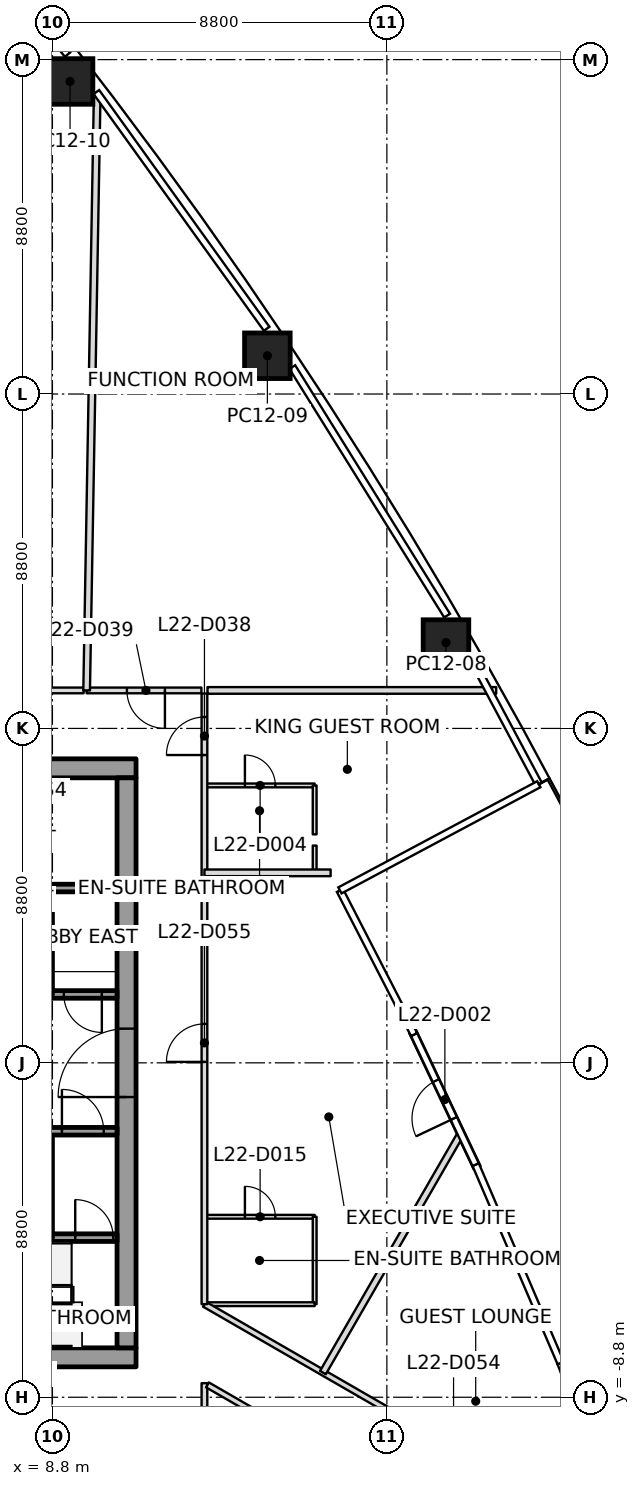
"""IFC4 building model, lengths in metres.
Left out: names, types, materials, properties, quantities, classifications, styles, units other than length and angle.
Written with IfcOpenShell. Run it as: python <this file> out.ifc"""

import sys

from ifc_helpers import new_model, si_unit, direction, frame, frame_2d, origin, origin_2d, place, context, subcontext, project, spatial, rectangle, extrude, clip, halfspace, element, fill, save


model = new_model("IFC4")
c1 = context("Model", 3, precision=1e-05, world=origin(), true_north=direction((0.0, 1.0)))
c2 = subcontext(c1, "Body", "Model", "MODEL_VIEW")
j1 = project(units=[si_unit("LENGTHUNIT", "METRE"), si_unit("PLANEANGLEUNIT", "RADIAN")], contexts=[c1])
p1 = place(None, origin())
s1 = spatial("IfcSite", under=j1, at=p1, CompositionType="ELEMENT")
p2 = place(p1, origin())
s2 = spatial("IfcBuilding", under=s1, at=p2, CompositionType="ELEMENT")
p3 = place(p2, frame((0.0, 0.0, 103.5)))
s3 = spatial("IfcBuildingStorey", under=s2, at=p3, CompositionType="ELEMENT", Elevation=103.5)
p4 = place(p3, frame((19.155, 11.059, 0.0), z_axis=(-0.010688725148, -0.006202099777, 0.999923639641), x_axis=(-0.499971436973, 0.8660418936, 2.7223042e-05)))
e1 = element("IfcColumn", 1, at=p4, inside=s3, PredefinedType="COLUMN", context=c2, shape_type="SweptSolid", body=[
    clip(extrude(rectangle(XDim=1.2, YDim=1.2, at=origin_2d()), origin(), (0.0, 0.0, 1.0), 3.7), halfspace(frame((0.0, 0.0, 3.699)), False)),
])
p5 = place(p3, frame((14.456, 18.607, 0.0), z_axis=(-0.005674016471, -0.014382971985, 0.999880460682), x_axis=(-0.556550590444, 0.830767199456, 0.008792075137)))
e2 = element("IfcColumn", 2, at=p5, inside=s3, PredefinedType="COLUMN", context=c2, shape_type="SweptSolid", body=[
    clip(extrude(rectangle(XDim=1.2, YDim=1.2, at=origin_2d()), origin(), (0.0, 0.0, 1.0), 3.7), halfspace(frame((0.0, 0.0, 3.698)), False)),
])
p6 = place(p3, frame((9.264, 25.825, 0.0), z_axis=(-0.000263874053, -0.022231388943, 0.999752817308), x_axis=(-0.610646978838, 0.791710789244, 0.01744400845)))
e3 = element("IfcColumn", 3, at=p6, inside=s3, PredefinedType="COLUMN", context=c2, shape_type="SweptSolid", body=[
    clip(extrude(rectangle(XDim=1.2, YDim=1.2, at=origin_2d()), origin(), (0.0, 0.0, 1.0), 3.701), halfspace(frame((0.0, 0.0, 3.698)), False)),
])
p7 = place(p3, frame((-11.0, -7.75, 0.0), z_axis=(0.0, 0.0, 1.0), x_axis=(1.0, 0.0, 0.0)))
e4 = element("IfcWall", 4, at=p7, inside=s3, PredefinedType="SHEAR", context=c2, shape_type="SweptSolid", body=[
    extrude(rectangle(XDim=22.0, YDim=0.5, at=frame_2d((11.0, 0.0))), origin(), (0.0, 0.0, 1.0), 3.7),
])
p8 = place(p7, frame((10.45, 0.0, 0.0)))
e5 = element("IfcOpeningElement", 5, at=p8, cuts=e4, PredefinedType="OPENING", context=c2, shape_type="SweptSolid", body=[
    extrude(rectangle(XDim=1.1, YDim=2.1, at=frame_2d((0.55, 1.05))), frame((0.0, 0.25, 0.0), z_axis=(0.0, -1.0, 0.0), x_axis=(1.0, 0.0, 0.0)), (0.0, 0.0, 1.0), 0.5),
])
p9 = place(p3, frame((-11.0, 7.75, 0.0), z_axis=(0.0, 0.0, 1.0), x_axis=(1.0, 0.0, 0.0)))
e6 = element("IfcWall", 6, at=p9, inside=s3, PredefinedType="SHEAR", context=c2, shape_type="SweptSolid", body=[
    extrude(rectangle(XDim=22.0, YDim=0.5, at=frame_2d((11.0, 0.0))), origin(), (0.0, 0.0, 1.0), 3.7),
])
p10 = place(p9, frame((10.45, 0.0, 0.0)))
e7 = element("IfcOpeningElement", 7, at=p10, cuts=e6, PredefinedType="OPENING", context=c2, shape_type="SweptSolid", body=[
    extrude(rectangle(XDim=1.1, YDim=2.1, at=frame_2d((0.55, 1.05))), frame((0.0, 0.25, 0.0), z_axis=(0.0, -1.0, 0.0), x_axis=(1.0, 0.0, 0.0)), (0.0, 0.0, 1.0), 0.5),
])
p11 = place(p3, frame((10.75, -7.5, 0.0), z_axis=(0.0, 0.0, 1.0), x_axis=(0.0, 1.0, 0.0)))
e8 = element("IfcWall", 8, at=p11, inside=s3, PredefinedType="SHEAR", context=c2, shape_type="SweptSolid", body=[
    extrude(rectangle(XDim=15.0, YDim=0.5, at=frame_2d((7.5, 0.0))), origin(), (0.0, 0.0, 1.0), 3.7),
])
p12 = place(p11, frame((6.6, 0.0, 0.0)))
e9 = element("IfcOpeningElement", 9, at=p12, cuts=e8, PredefinedType="OPENING", context=c2, shape_type="SweptSolid", body=[
    extrude(rectangle(XDim=1.8, YDim=2.1, at=frame_2d((0.9, 1.05))), frame((0.0, 0.25, 0.0), z_axis=(0.0, -1.0, 0.0), x_axis=(1.0, 0.0, 0.0)), (0.0, 0.0, 1.0), 0.5),
])
p13 = place(p3, frame((19.975, -2.759, 0.0), z_axis=(0.0, 0.0, 1.0), x_axis=(-0.427856133111, 0.903846850611, 0.0)))
e10 = element("IfcWall", 10, at=p13, inside=s3, PredefinedType="SOLIDWALL", context=c2, shape_type="SweptSolid", body=[
    extrude(rectangle(XDim=3.966, YDim=0.2, at=frame_2d((1.983, 0.0))), origin(), (0.0, 0.0, 1.0), 2.947),
])
p14 = place(p13, frame((1.433, 0.0, 0.0)))
e11 = element("IfcOpeningElement", 11, at=p14, cuts=e10, PredefinedType="OPENING", context=c2, shape_type="SweptSolid", body=[
    extrude(rectangle(XDim=1.1, YDim=2.1, at=frame_2d((0.55, 1.05))), frame((0.0, 0.1, 0.0), z_axis=(0.0, -1.0, 0.0), x_axis=(1.0, 0.0, 0.0)), (0.0, 0.0, 1.0), 0.2),
])
p15 = place(p3, frame((8.7, -4.6, 0.0), z_axis=(0.0, 0.0, 1.0), x_axis=(1.0, 0.0, 0.0)))
e12 = element("IfcWall", 12, at=p15, inside=s3, PredefinedType="SOLIDWALL", context=c2, shape_type="SweptSolid", body=[
    extrude(rectangle(XDim=1.8, YDim=0.2, at=frame_2d((0.9, 0.0))), origin(), (0.0, 0.0, 1.0), 3.55),
])
p16 = place(p15, frame((0.7, 0.0, 0.0)))
e13 = element("IfcOpeningElement", 13, at=p16, cuts=e12, PredefinedType="OPENING", context=c2, shape_type="SweptSolid", body=[
    extrude(rectangle(XDim=1.0, YDim=2.1, at=frame_2d((0.5, 1.05))), frame((0.0, 0.1, 0.0), z_axis=(0.0, -1.0, 0.0), x_axis=(1.0, 0.0, 0.0)), (0.0, 0.0, 1.0), 0.2),
])
p17 = place(p3, frame((8.7, -1.8, 0.0), z_axis=(0.0, 0.0, 1.0), x_axis=(0.0, -1.0, 0.0)))
e14 = element("IfcWall", 14, at=p17, inside=s3, PredefinedType="SOLIDWALL", context=c2, shape_type="SweptSolid", body=[
    extrude(rectangle(XDim=2.8, YDim=0.2, at=frame_2d((1.4, 0.0))), origin(), (0.0, 0.0, 1.0), 3.55),
])
p18 = place(p3, frame((8.7, -1.8, 0.0), z_axis=(0.0, 0.0, 1.0), x_axis=(1.0, 0.0, 0.0)))
e15 = element("IfcWall", 15, at=p18, inside=s3, PredefinedType="SOLIDWALL", context=c2, shape_type="SweptSolid", body=[
    extrude(rectangle(XDim=1.8, YDim=0.2, at=frame_2d((0.9, 0.0))), origin(), (0.0, 0.0, 1.0), 3.55),
])
p19 = place(p18, frame((0.35, 0.0, 0.0)))
e16 = element("IfcOpeningElement", 16, at=p19, cuts=e15, PredefinedType="OPENING", context=c2, shape_type="SweptSolid", body=[
    extrude(rectangle(XDim=1.1, YDim=2.1, at=frame_2d((0.55, 1.05))), frame((0.0, 0.1, 0.0), z_axis=(0.0, -1.0, 0.0), x_axis=(1.0, 0.0, 0.0)), (0.0, 0.0, 1.0), 0.2),
])
p20 = place(p3, frame((10.5, 1.8, 0.0), z_axis=(0.0, 0.0, 1.0), x_axis=(-1.0, 0.0, 0.0)))
e17 = element("IfcWall", 17, at=p20, inside=s3, PredefinedType="SOLIDWALL", context=c2, shape_type="SweptSolid", body=[
    extrude(rectangle(XDim=1.8, YDim=0.2, at=frame_2d((0.9, 0.0))), origin(), (0.0, 0.0, 1.0), 3.55),
])
p21 = place(p20, frame((0.4, 0.0, 0.0)))
e18 = element("IfcOpeningElement", 18, at=p21, cuts=e17, PredefinedType="OPENING", context=c2, shape_type="SweptSolid", body=[
    extrude(rectangle(XDim=1.0, YDim=2.1, at=frame_2d((0.5, 1.05))), frame((0.0, 0.1, 0.0), z_axis=(0.0, -1.0, 0.0), x_axis=(1.0, 0.0, 0.0)), (0.0, 0.0, 1.0), 0.2),
])
p22 = place(p3, frame((8.7, 4.6, 0.0), z_axis=(0.0, 0.0, 1.0), x_axis=(0.0, -1.0, 0.0)))
e19 = element("IfcWall", 19, at=p22, inside=s3, PredefinedType="SOLIDWALL", context=c2, shape_type="SweptSolid", body=[
    extrude(rectangle(XDim=2.8, YDim=0.2, at=frame_2d((1.4, 0.0))), origin(), (0.0, 0.0, 1.0), 3.55),
])
p23 = place(p3, frame((10.5, 4.6, 0.0), z_axis=(0.0, 0.0, 1.0), x_axis=(-1.0, 0.0, 0.0)))
e20 = element("IfcWall", 20, at=p23, inside=s3, PredefinedType="SOLIDWALL", context=c2, shape_type="SweptSolid", body=[
    extrude(rectangle(XDim=1.8, YDim=0.2, at=frame_2d((0.9, 0.0))), origin(), (0.0, 0.0, 1.0), 3.55),
])
p24 = place(p3, frame((9.977, 25.418, 0.0), z_axis=(0.0, 0.0, 1.0), x_axis=(-0.017723443948, -0.999842927431, 0.0)))
e21 = element("IfcWall", 21, at=p24, inside=s3, PredefinedType="PARTITIONING", context=c2, shape_type="SweptSolid", body=[
    extrude(rectangle(XDim=15.621, YDim=0.175, at=frame_2d((7.811, 0.0))), origin(), (0.0, 0.0, 1.0), 2.934),
])
p25 = place(p3, frame((16.12, 5.0, 0.0), z_axis=(0.0, 0.0, 1.0), x_axis=(-1.0, 0.0, 0.0)))
e22 = element("IfcWall", 22, at=p25, inside=s3, PredefinedType="PARTITIONING", context=c2, shape_type="SweptSolid", body=[
    extrude(rectangle(XDim=3.32, YDim=0.175, at=frame_2d((1.66, 0.0))), origin(), (0.0, 0.0, 1.0), 3.15),
])
p26 = place(p3, frame((12.88, 9.8, 0.0), z_axis=(0.0, 0.0, 1.0), x_axis=(1.0, 0.0, 0.0)))
e23 = element("IfcWall", 23, at=p26, inside=s3, PredefinedType="PARTITIONING", context=c2, shape_type="SweptSolid", body=[
    extrude(rectangle(XDim=7.597, YDim=0.175, at=frame_2d((3.799, 0.0))), origin(), (0.0, 0.0, 1.0), 2.934),
])
p27 = place(p3, frame((19.554, -1.853, 0.0), z_axis=(0.0, 0.0, 1.0), x_axis=(-0.500006290091, -0.866021772168, 0.0)))
e24 = element("IfcWall", 24, at=p27, inside=s3, PredefinedType="PARTITIONING", context=c2, shape_type="SweptSolid", body=[
    extrude(rectangle(XDim=7.272, YDim=0.175, at=frame_2d((3.636, 0.0))), origin(), (0.0, 0.0, 1.0), 2.947),
])
p28 = place(p3, frame((9.62, 9.8, 0.0), z_axis=(0.0, 0.0, 1.0), x_axis=(-1.0, 0.0, 0.0)))
e25 = element("IfcWall", 25, at=p28, inside=s3, PredefinedType="PARTITIONING", context=c2, shape_type="SweptSolid", body=[
    extrude(rectangle(XDim=8.72, YDim=0.15, at=frame_2d((4.36, 0.0))), origin(), (0.0, 0.0, 1.0), 2.947),
])
p29 = place(p3, frame((12.72, 9.8, 0.0), z_axis=(0.0, 0.0, 1.0), x_axis=(-1.0, 0.0, 0.0)))
e26 = element("IfcWall", 26, at=p29, inside=s3, PredefinedType="PARTITIONING", context=c2, shape_type="SweptSolid", body=[
    extrude(rectangle(XDim=3.02, YDim=0.15, at=frame_2d((1.51, 0.0))), origin(), (0.0, 0.0, 1.0), 3.15),
])
p30 = place(p29, frame((0.96, 0.0, 0.0)))
e27 = element("IfcOpeningElement", 27, at=p30, cuts=e26, PredefinedType="OPENING", context=c2, shape_type="SweptSolid", body=[
    extrude(rectangle(XDim=1.0, YDim=2.1, at=frame_2d((0.5, 1.05))), frame((0.0, 0.075, 0.0), z_axis=(0.0, -1.0, 0.0), x_axis=(1.0, 0.0, 0.0)), (0.0, 0.0, 1.0), 0.15),
])
p31 = place(p3, frame((12.8, -9.72, 0.0), z_axis=(0.0, 0.0, 1.0), x_axis=(0.0, 1.0, 0.0)))
e28 = element("IfcWall", 28, at=p31, inside=s3, PredefinedType="PARTITIONING", context=c2, shape_type="SweptSolid", body=[
    extrude(rectangle(XDim=1.291, YDim=0.15, at=frame_2d((0.646, 0.0))), origin(), (0.0, 0.0, 1.0), 2.797),
])
p32 = place(p3, frame((12.879, -8.475, 0.0), z_axis=(0.0, 0.0, 1.0), x_axis=(0.866019944116, -0.500009456303, 0.0)))
e29 = element("IfcWall", 29, at=p32, inside=s3, PredefinedType="PARTITIONING", context=c2, shape_type="SweptSolid", body=[
    extrude(rectangle(XDim=10.407, YDim=0.15, at=frame_2d((5.204, 0.0))), origin(), (0.0, 0.0, 1.0), 2.797),
])
p33 = place(p32, frame((5.858, 0.0, 0.0)))
e30 = element("IfcOpeningElement", 30, at=p33, cuts=e29, PredefinedType="OPENING", context=c2, shape_type="SweptSolid", body=[
    extrude(rectangle(XDim=1.0, YDim=2.1, at=frame_2d((0.5, 1.05))), frame((0.0, 0.075, 0.0), z_axis=(0.0, -1.0, 0.0), x_axis=(1.0, 0.0, 0.0)), (0.0, 0.0, 1.0), 0.15),
])
p34 = place(p3, frame((22.723, -12.08, 0.0), z_axis=(0.0, 0.0, 1.0), x_axis=(-0.866023783073, 0.500002807145, 0.0)))
e31 = element("IfcWall", 31, at=p34, inside=s3, PredefinedType="PARTITIONING", context=c2, shape_type="SweptSolid", body=[
    extrude(rectangle(XDim=11.458, YDim=0.15, at=frame_2d((5.729, 0.0))), origin(), (0.0, 0.0, 1.0), 2.947),
])
p35 = place(p34, frame((3.389, 0.0, 0.0)))
e32 = element("IfcOpeningElement", 32, at=p35, cuts=e31, PredefinedType="OPENING", context=c2, shape_type="SweptSolid", body=[
    extrude(rectangle(XDim=1.0, YDim=2.1, at=frame_2d((0.5, 1.05))), frame((0.0, 0.075, 0.0), z_axis=(0.0, -1.0, 0.0), x_axis=(1.0, 0.0, 0.0)), (0.0, 0.0, 1.0), 0.15),
])
p36 = place(p3, frame((12.8, -6.351, 0.0), z_axis=(0.0, 0.0, 1.0), x_axis=(0.0, 1.0, 0.0)))
e33 = element("IfcWall", 33, at=p36, inside=s3, PredefinedType="PARTITIONING", context=c2, shape_type="SweptSolid", body=[
    extrude(rectangle(XDim=16.071, YDim=0.15, at=frame_2d((8.035, 0.0))), origin(), (0.0, 0.0, 1.0), 2.947),
])
p37 = place(p36, frame((14.451, 0.0, 0.0)))
e34 = element("IfcOpeningElement", 34, at=p37, cuts=e33, PredefinedType="OPENING", context=c2, shape_type="SweptSolid", body=[
    extrude(rectangle(XDim=1.0, YDim=2.1, at=frame_2d((0.5, 1.05))), frame((0.0, 0.075, 0.0), z_axis=(0.0, -1.0, 0.0), x_axis=(1.0, 0.0, 0.0)), (0.0, 0.0, 1.0), 0.15),
])
p38 = place(p36, frame((6.375, 0.0, 0.0)))
e35 = element("IfcOpeningElement", 35, at=p38, cuts=e33, PredefinedType="OPENING", context=c2, shape_type="SweptSolid", body=[
    extrude(rectangle(XDim=1.0, YDim=2.1, at=frame_2d((0.5, 1.05))), frame((0.0, 0.075, 0.0), z_axis=(0.0, -1.0, 0.0), x_axis=(1.0, 0.0, 0.0)), (0.0, 0.0, 1.0), 0.15),
])
p39 = place(p3, frame((12.83, -4.051, 0.0), z_axis=(0.0, 0.0, 1.0), x_axis=(1.0, 0.0, 0.0)))
e36 = element("IfcWall", 36, at=p39, inside=s3, PredefinedType="PARTITIONING", context=c2, shape_type="SweptSolid", body=[
    extrude(rectangle(XDim=2.87, YDim=0.1, at=frame_2d((1.435, 0.0))), origin(), (0.0, 0.0, 1.0), 2.947),
])
p40 = place(p39, frame((1.035, 0.0, 0.0)))
e37 = element("IfcOpeningElement", 37, at=p40, cuts=e36, PredefinedType="OPENING", context=c2, shape_type="SweptSolid", body=[
    extrude(rectangle(XDim=0.8, YDim=2.1, at=frame_2d((0.4, 1.05))), frame((0.0, 0.05, 0.0), z_axis=(0.0, -1.0, 0.0), x_axis=(1.0, 0.0, 0.0)), (0.0, 0.0, 1.0), 0.1),
])
p41 = place(p3, frame((15.7, -4.051, 0.0), z_axis=(0.0, 0.0, 1.0), x_axis=(0.0, -1.0, 0.0)))
e38 = element("IfcWall", 38, at=p41, inside=s3, PredefinedType="PARTITIONING", context=c2, shape_type="SweptSolid", body=[
    extrude(rectangle(XDim=2.3, YDim=0.1, at=frame_2d((1.15, 0.0))), origin(), (0.0, 0.0, 1.0), 3.15),
])
p42 = place(p3, frame((15.7, -6.351, 0.0), z_axis=(0.0, 0.0, 1.0), x_axis=(-1.0, 0.0, 0.0)))
e39 = element("IfcWall", 39, at=p42, inside=s3, PredefinedType="PARTITIONING", context=c2, shape_type="SweptSolid", body=[
    extrude(rectangle(XDim=2.84, YDim=0.1, at=frame_2d((1.42, 0.0))), origin(), (0.0, 0.0, 1.0), 3.15),
])
p43 = place(p3, frame((12.83, 7.3, 0.0), z_axis=(0.0, 0.0, 1.0), x_axis=(1.0, 0.0, 0.0)))
e40 = element("IfcWall", 40, at=p43, inside=s3, PredefinedType="PARTITIONING", context=c2, shape_type="SweptSolid", body=[
    extrude(rectangle(XDim=2.87, YDim=0.1, at=frame_2d((1.435, 0.0))), origin(), (0.0, 0.0, 1.0), 3.093),
])
p44 = place(p43, frame((1.035, 0.0, 0.0)))
e41 = element("IfcOpeningElement", 41, at=p44, cuts=e40, PredefinedType="OPENING", context=c2, shape_type="SweptSolid", body=[
    extrude(rectangle(XDim=0.8, YDim=2.1, at=frame_2d((0.4, 1.05))), frame((0.0, 0.05, 0.0), z_axis=(0.0, -1.0, 0.0), x_axis=(1.0, 0.0, 0.0)), (0.0, 0.0, 1.0), 0.1),
])
p45 = place(p3, frame((15.7, 7.3, 0.0), z_axis=(0.0, 0.0, 1.0), x_axis=(0.0, -1.0, 0.0)))
e42 = element("IfcWall", 42, at=p45, inside=s3, PredefinedType="PARTITIONING", context=c2, shape_type="SweptSolid", body=[
    extrude(rectangle(XDim=1.288, YDim=0.1, at=frame_2d((0.644, 0.0))), origin(), (0.0, 0.0, 1.0), 3.093),
])
p46 = place(p3, frame((15.7, 5.717, 0.0), z_axis=(0.0, 0.0, 1.0), x_axis=(0.0, -1.0, 0.0)))
e43 = element("IfcWall", 43, at=p46, inside=s3, PredefinedType="PARTITIONING", context=c2, shape_type="SweptSolid", body=[
    extrude(rectangle(XDim=0.687, YDim=0.1, at=frame_2d((0.344, 0.0))), origin(), (0.0, 0.0, 1.0), 3.15),
])
p47 = place(p14, origin())
e44 = element("IfcDoor", 44, at=p47, inside=s3, OperationType="SINGLE_SWING_LEFT", PredefinedType="DOOR", context=c2, shape_type="SweptSolid", body=[
    extrude(rectangle(XDim=1.1, YDim=2.1, at=frame_2d((0.55, 1.05))), frame((0.0, 0.025, 0.0), z_axis=(0.0, -1.0, 0.0), x_axis=(1.0, 0.0, 0.0)), (0.0, 0.0, 1.0), 0.05),
])
fill(e11, e44)
p48 = place(p37, origin())
e45 = element("IfcDoor", 45, at=p48, inside=s3, OperationType="SINGLE_SWING_LEFT", PredefinedType="DOOR", context=c2, shape_type="SweptSolid", body=[
    extrude(rectangle(XDim=1.0, YDim=2.1, at=frame_2d((0.5, 1.05))), frame((0.0, 0.025, 0.0), z_axis=(0.0, -1.0, 0.0), x_axis=(1.0, 0.0, 0.0)), (0.0, 0.0, 1.0), 0.05),
])
fill(e34, e45)
p49 = place(p44, origin())
e46 = element("IfcDoor", 46, at=p49, inside=s3, OperationType="SINGLE_SWING_LEFT", PredefinedType="DOOR", context=c2, shape_type="SweptSolid", body=[
    extrude(rectangle(XDim=0.8, YDim=2.1, at=frame_2d((0.4, 1.05))), frame((0.0, 0.025, 0.0), z_axis=(0.0, -1.0, 0.0), x_axis=(1.0, 0.0, 0.0)), (0.0, 0.0, 1.0), 0.05),
])
fill(e41, e46)
p50 = place(p30, origin())
e47 = element("IfcDoor", 47, at=p50, inside=s3, OperationType="SINGLE_SWING_LEFT", PredefinedType="DOOR", context=c2, shape_type="SweptSolid", body=[
    extrude(rectangle(XDim=1.0, YDim=2.1, at=frame_2d((0.5, 1.05))), frame((0.0, 0.025, 0.0), z_axis=(0.0, -1.0, 0.0), x_axis=(1.0, 0.0, 0.0)), (0.0, 0.0, 1.0), 0.05),
])
fill(e27, e47)
p51 = place(p38, origin())
e48 = element("IfcDoor", 48, at=p51, inside=s3, OperationType="SINGLE_SWING_LEFT", PredefinedType="DOOR", context=c2, shape_type="SweptSolid", body=[
    extrude(rectangle(XDim=1.0, YDim=2.1, at=frame_2d((0.5, 1.05))), frame((0.0, 0.025, 0.0), z_axis=(0.0, -1.0, 0.0), x_axis=(1.0, 0.0, 0.0)), (0.0, 0.0, 1.0), 0.05),
])
fill(e35, e48)
p52 = place(p40, origin())
e49 = element("IfcDoor", 49, at=p52, inside=s3, OperationType="SINGLE_SWING_LEFT", PredefinedType="DOOR", context=c2, shape_type="SweptSolid", body=[
    extrude(rectangle(XDim=0.8, YDim=2.1, at=frame_2d((0.4, 1.05))), frame((0.0, 0.025, 0.0), z_axis=(0.0, -1.0, 0.0), x_axis=(1.0, 0.0, 0.0)), (0.0, 0.0, 1.0), 0.05),
])
fill(e37, e49)
p53 = place(p19, origin())
e50 = element("IfcDoor", 50, at=p53, inside=s3, OperationType="SINGLE_SWING_RIGHT", PredefinedType="DOOR", context=c2, shape_type="SweptSolid", body=[
    extrude(rectangle(XDim=1.1, YDim=2.1, at=frame_2d((0.55, 1.05))), frame((0.0, 0.025, 0.0), z_axis=(0.0, -1.0, 0.0), x_axis=(1.0, 0.0, 0.0)), (0.0, 0.0, 1.0), 0.05),
])
fill(e16, e50)
p54 = place(p21, origin())
e51 = element("IfcDoor", 51, at=p54, inside=s3, OperationType="SINGLE_SWING_LEFT", PredefinedType="DOOR", context=c2, shape_type="SweptSolid", body=[
    extrude(rectangle(XDim=1.0, YDim=2.1, at=frame_2d((0.5, 1.05))), frame((0.0, 0.025, 0.0), z_axis=(0.0, -1.0, 0.0), x_axis=(1.0, 0.0, 0.0)), (0.0, 0.0, 1.0), 0.05),
])
fill(e18, e51)
p55 = place(p16, origin())
e52 = element("IfcDoor", 52, at=p55, inside=s3, OperationType="SINGLE_SWING_RIGHT", PredefinedType="DOOR", context=c2, shape_type="SweptSolid", body=[
    extrude(rectangle(XDim=1.0, YDim=2.1, at=frame_2d((0.5, 1.05))), frame((0.0, 0.025, 0.0), z_axis=(0.0, -1.0, 0.0), x_axis=(1.0, 0.0, 0.0)), (0.0, 0.0, 1.0), 0.05),
])
fill(e13, e52)
p56 = place(p12, origin())
e53 = element("IfcDoor", 53, at=p56, inside=s3, OperationType="DOUBLE_DOOR_SINGLE_SWING", PredefinedType="DOOR", context=c2, shape_type="SweptSolid", body=[
    extrude(rectangle(XDim=1.8, YDim=2.1, at=frame_2d((0.9, 1.05))), frame((0.0, 0.025, 0.0), z_axis=(0.0, -1.0, 0.0), x_axis=(1.0, 0.0, 0.0)), (0.0, 0.0, 1.0), 0.05),
])
fill(e9, e53)
save(model, sys.argv[1])
